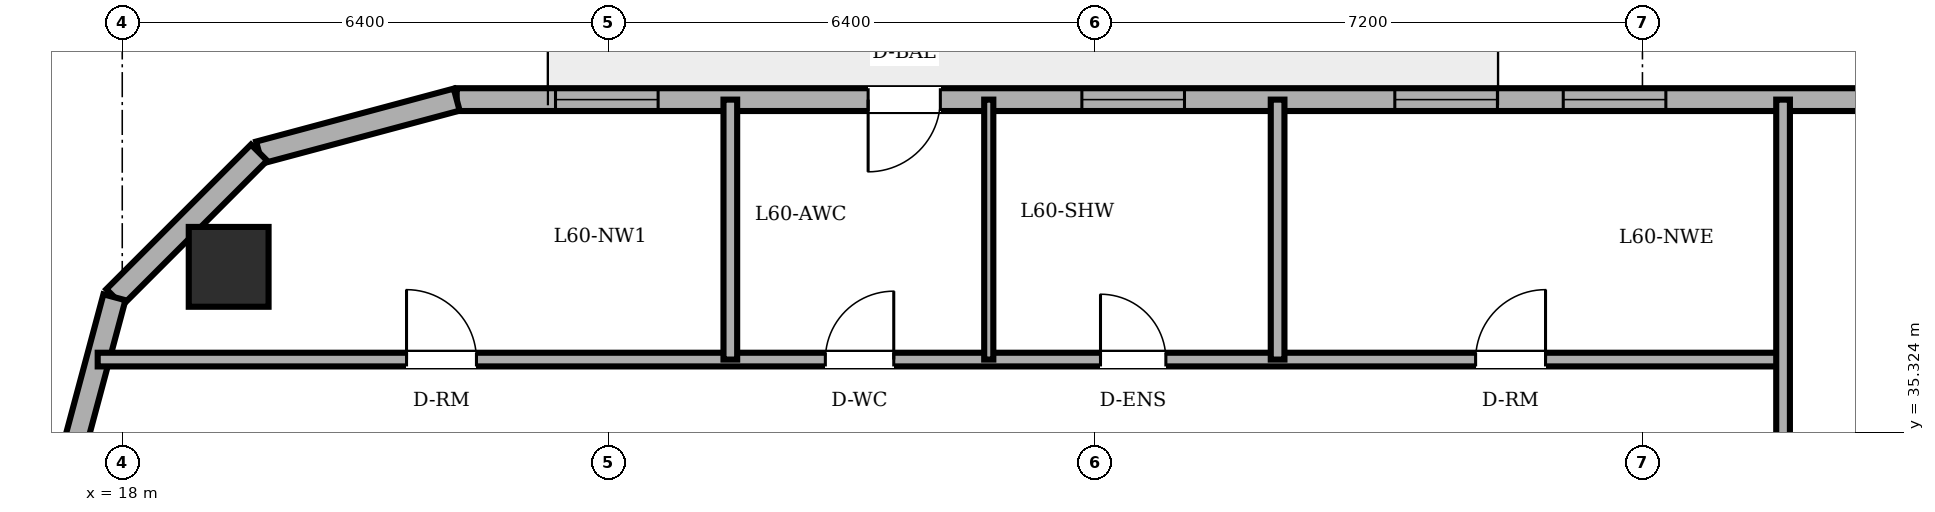
"""IFC4 building model, lengths in metres.
Left out: names, types, materials, properties, quantities, classifications, styles, units other than length and angle.
Written with IfcOpenShell. Run it as: python <this file> out.ifc"""

import sys

from ifc_helpers import new_model, si_unit, direction, frame, frame_2d, origin, origin_2d, place, context, subcontext, project, spatial, rectangle, circle, extrude, element, fill, save


model = new_model("IFC4")
c1 = context("Model", 3, precision=1e-05, world=origin(), true_north=direction((0.0, 1.0)))
c2 = subcontext(c1, "Body", "Model", "MODEL_VIEW")
j1 = project(units=[si_unit("LENGTHUNIT", "METRE"), si_unit("PLANEANGLEUNIT", "RADIAN")], contexts=[c1])
p1 = place(None, origin())
s1 = spatial("IfcSite", under=j1, at=p1, CompositionType="ELEMENT")
p2 = place(p1, origin())
s2 = spatial("IfcBuilding", under=s1, at=p2, CompositionType="ELEMENT")
p3 = place(p2, frame((0.0, 0.0, 230.1)))
s3 = spatial("IfcBuildingStorey", under=s2, at=p3, CompositionType="ELEMENT", Elevation=230.1)
p4 = place(p3, frame((19.4, 37.5, 0.0), z_axis=(0.0, 0.0, 1.0), x_axis=(1.0, 0.0, 0.0)))
e1 = element("IfcColumn", 1, at=p4, inside=s3, PredefinedType="COLUMN", context=c2, shape_type="SweptSolid", body=[
    extrude(circle(Radius=0.525, at=origin_2d()), origin(), (0.0, 0.0, 1.0), 3.6),
])
p5 = place(p3, frame((54.885, 39.7, 0.0), z_axis=(0.0, 0.0, 1.0), x_axis=(-1.0, 0.0, 0.0)))
e2 = element("IfcWall", 2, at=p5, inside=s3, PredefinedType="SOLIDWALL", context=c2, shape_type="SweptSolid", body=[
    extrude(rectangle(XDim=32.485, YDim=0.3, at=frame_2d((16.243, 0.0))), origin(), (0.0, 0.0, 1.0), 3.4),
])
p6 = place(p5, frame((26.122, 0.0, 0.0)))
e3 = element("IfcOpeningElement", 3, at=p6, cuts=e2, PredefinedType="OPENING", context=c2, shape_type="SweptSolid", body=[
    extrude(rectangle(XDim=0.95, YDim=2.2, at=frame_2d((0.475, 1.1))), frame((0.0, 0.16, 0.0), z_axis=(0.0, -1.0, 0.0), x_axis=(1.0, 0.0, 0.0)), (0.0, 0.0, 1.0), 0.32),
])
p7 = place(p5, frame((4.57, 0.0, 0.85)))
e4 = element("IfcOpeningElement", 4, at=p7, cuts=e2, PredefinedType="OPENING", context=c2, shape_type="SweptSolid", body=[
    extrude(rectangle(XDim=1.35, YDim=1.55, at=frame_2d((0.675, 0.775))), frame((0.0, 0.16, 0.0), z_axis=(0.0, -1.0, 0.0), x_axis=(1.0, 0.0, 0.0)), (0.0, 0.0, 1.0), 0.32),
])
p8 = place(p5, frame((9.465, 0.0, 0.85)))
e5 = element("IfcOpeningElement", 5, at=p8, cuts=e2, PredefinedType="OPENING", context=c2, shape_type="SweptSolid", body=[
    extrude(rectangle(XDim=1.35, YDim=1.55, at=frame_2d((0.675, 0.775))), frame((0.0, 0.16, 0.0), z_axis=(0.0, -1.0, 0.0), x_axis=(1.0, 0.0, 0.0)), (0.0, 0.0, 1.0), 0.32),
])
p9 = place(p5, frame((16.577, 0.0, 0.85)))
e6 = element("IfcOpeningElement", 6, at=p9, cuts=e2, PredefinedType="OPENING", context=c2, shape_type="SweptSolid", body=[
    extrude(rectangle(XDim=1.35, YDim=1.55, at=frame_2d((0.675, 0.775))), frame((0.0, 0.16, 0.0), z_axis=(0.0, -1.0, 0.0), x_axis=(1.0, 0.0, 0.0)), (0.0, 0.0, 1.0), 0.32),
])
p10 = place(p5, frame((18.793, 0.0, 0.85)))
e7 = element("IfcOpeningElement", 7, at=p10, cuts=e2, PredefinedType="OPENING", context=c2, shape_type="SweptSolid", body=[
    extrude(rectangle(XDim=1.35, YDim=1.55, at=frame_2d((0.675, 0.775))), frame((0.0, 0.16, 0.0), z_axis=(0.0, -1.0, 0.0), x_axis=(1.0, 0.0, 0.0)), (0.0, 0.0, 1.0), 0.32),
])
p11 = place(p5, frame((22.91, 0.0, 0.85)))
e8 = element("IfcOpeningElement", 8, at=p11, cuts=e2, PredefinedType="OPENING", context=c2, shape_type="SweptSolid", body=[
    extrude(rectangle(XDim=1.35, YDim=1.55, at=frame_2d((0.675, 0.775))), frame((0.0, 0.16, 0.0), z_axis=(0.0, -1.0, 0.0), x_axis=(1.0, 0.0, 0.0)), (0.0, 0.0, 1.0), 0.32),
])
p12 = place(p5, frame((29.835, 0.0, 0.85)))
e9 = element("IfcOpeningElement", 9, at=p12, cuts=e2, PredefinedType="OPENING", context=c2, shape_type="SweptSolid", body=[
    extrude(rectangle(XDim=1.35, YDim=1.55, at=frame_2d((0.675, 0.775))), frame((0.0, 0.16, 0.0), z_axis=(0.0, -1.0, 0.0), x_axis=(1.0, 0.0, 0.0)), (0.0, 0.0, 1.0), 0.32),
])
p13 = place(p3, frame((22.4, 39.7, 0.0), z_axis=(0.0, 0.0, 1.0), x_axis=(-0.965889330541, -0.258955210695, 0.0)))
e10 = element("IfcWall", 10, at=p13, inside=s3, PredefinedType="SOLIDWALL", context=c2, shape_type="SweptSolid", body=[
    extrude(rectangle(XDim=2.692, YDim=0.3, at=frame_2d((1.346, 0.0))), origin(), (0.0, 0.0, 1.0), 3.4),
])
p14 = place(p3, frame((19.8, 39.003, 0.0), z_axis=(0.0, 0.0, 1.0), x_axis=(-0.707152139074, -0.70706142039, 0.0)))
e11 = element("IfcWall", 11, at=p14, inside=s3, PredefinedType="SOLIDWALL", context=c2, shape_type="SweptSolid", body=[
    extrude(rectangle(XDim=2.691, YDim=0.3, at=frame_2d((1.346, 0.0))), origin(), (0.0, 0.0, 1.0), 3.4),
])
p15 = place(p3, frame((17.897, 37.1, 0.0), z_axis=(0.0, 0.0, 1.0), x_axis=(-0.258932525951, -0.965895412042, 0.0)))
e12 = element("IfcWall", 12, at=p15, inside=s3, PredefinedType="SOLIDWALL", context=c2, shape_type="SweptSolid", body=[
    extrude(rectangle(XDim=2.692, YDim=0.3, at=frame_2d((1.346, 0.0))), origin(), (0.0, 0.0, 1.0), 3.4),
])
p16 = place(p3, frame((17.677, 36.28, 0.0), z_axis=(0.0, 0.0, 1.0), x_axis=(1.0, 0.0, 0.0)))
e13 = element("IfcWall", 13, at=p16, inside=s3, PredefinedType="PARTITIONING", context=c2, shape_type="SweptSolid", body=[
    extrude(rectangle(XDim=22.173, YDim=0.18, at=frame_2d((11.086, 0.0))), origin(), (0.0, 0.0, 1.0), 3.4),
])
p17 = place(p16, frame((9.573, 0.0, 0.0)))
e14 = element("IfcOpeningElement", 14, at=p17, cuts=e13, PredefinedType="OPENING", context=c2, shape_type="SweptSolid", body=[
    extrude(rectangle(XDim=0.9, YDim=2.1, at=frame_2d((0.45, 1.05))), frame((0.0, 0.1, 0.0), z_axis=(0.0, -1.0, 0.0), x_axis=(1.0, 0.0, 0.0)), (0.0, 0.0, 1.0), 0.2),
])
p18 = place(p16, frame((13.193, 0.0, 0.0)))
e15 = element("IfcOpeningElement", 15, at=p18, cuts=e13, PredefinedType="OPENING", context=c2, shape_type="SweptSolid", body=[
    extrude(rectangle(XDim=0.86, YDim=2.1, at=frame_2d((0.43, 1.05))), frame((0.0, 0.1, 0.0), z_axis=(0.0, -1.0, 0.0), x_axis=(1.0, 0.0, 0.0)), (0.0, 0.0, 1.0), 0.2),
])
p19 = place(p16, frame((4.063, 0.0, 0.0)))
e16 = element("IfcOpeningElement", 16, at=p19, cuts=e13, PredefinedType="OPENING", context=c2, shape_type="SweptSolid", body=[
    extrude(rectangle(XDim=0.92, YDim=2.1, at=frame_2d((0.46, 1.05))), frame((0.0, 0.1, 0.0), z_axis=(0.0, -1.0, 0.0), x_axis=(1.0, 0.0, 0.0)), (0.0, 0.0, 1.0), 0.2),
])
p20 = place(p16, frame((18.128, 0.0, 0.0)))
e17 = element("IfcOpeningElement", 17, at=p20, cuts=e13, PredefinedType="OPENING", context=c2, shape_type="SweptSolid", body=[
    extrude(rectangle(XDim=0.92, YDim=2.1, at=frame_2d((0.46, 1.05))), frame((0.0, 0.1, 0.0), z_axis=(0.0, -1.0, 0.0), x_axis=(1.0, 0.0, 0.0)), (0.0, 0.0, 1.0), 0.2),
])
p21 = place(p3, frame((26.0, 36.28, 0.0), z_axis=(0.0, 0.0, 1.0), x_axis=(0.0, 1.0, 0.0)))
e18 = element("IfcWall", 18, at=p21, inside=s3, PredefinedType="PARTITIONING", context=c2, shape_type="SweptSolid", body=[
    extrude(rectangle(XDim=3.42, YDim=0.18, at=frame_2d((1.71, 0.0))), origin(), (0.0, 0.0, 1.0), 3.4),
])
p22 = place(p3, frame((29.4, 36.28, 0.0), z_axis=(0.0, 0.0, 1.0), x_axis=(0.0, 1.0, 0.0)))
e19 = element("IfcWall", 19, at=p22, inside=s3, PredefinedType="PARTITIONING", context=c2, shape_type="SweptSolid", body=[
    extrude(rectangle(XDim=3.42, YDim=0.12, at=frame_2d((1.71, 0.0))), origin(), (0.0, 0.0, 1.0), 3.4),
])
p23 = place(p3, frame((33.2, 36.28, 0.0), z_axis=(0.0, 0.0, 1.0), x_axis=(0.0, 1.0, 0.0)))
e20 = element("IfcWall", 20, at=p23, inside=s3, PredefinedType="PARTITIONING", context=c2, shape_type="SweptSolid", body=[
    extrude(rectangle(XDim=3.42, YDim=0.18, at=frame_2d((1.71, 0.0))), origin(), (0.0, 0.0, 1.0), 3.4),
])
p24 = place(p3, frame((39.85, 25.18, 0.0), z_axis=(0.0, 0.0, 1.0), x_axis=(0.0, 1.0, 0.0)))
e21 = element("IfcWall", 21, at=p24, inside=s3, PredefinedType="PARTITIONING", context=c2, shape_type="SweptSolid", body=[
    extrude(rectangle(XDim=14.52, YDim=0.18, at=frame_2d((7.26, 0.0))), origin(), (0.0, 0.0, 1.0), 3.4),
])
p25 = place(p6, origin())
e22 = element("IfcDoor", 22, at=p25, inside=s3, OperationType="SINGLE_SWING_RIGHT", PredefinedType="DOOR", context=c2, shape_type="SweptSolid", body=[
    extrude(rectangle(XDim=0.95, YDim=2.2, at=frame_2d((0.475, 1.1))), frame((0.0, 0.025, 0.0), z_axis=(0.0, -1.0, 0.0), x_axis=(1.0, 0.0, 0.0)), (0.0, 0.0, 1.0), 0.05),
])
fill(e3, e22)
p26 = place(p9, origin())
e23 = element("IfcWindow", 23, at=p26, inside=s3, PartitioningType="SINGLE_PANEL", PredefinedType="WINDOW", context=c2, shape_type="SweptSolid", body=[
    extrude(rectangle(XDim=1.35, YDim=1.55, at=frame_2d((0.675, 0.775))), frame((0.0, 0.03, 0.0), z_axis=(0.0, -1.0, 0.0), x_axis=(1.0, 0.0, 0.0)), (0.0, 0.0, 1.0), 0.06),
])
fill(e6, e23)
p27 = place(p10, origin())
e24 = element("IfcWindow", 24, at=p27, inside=s3, PartitioningType="SINGLE_PANEL", PredefinedType="WINDOW", context=c2, shape_type="SweptSolid", body=[
    extrude(rectangle(XDim=1.35, YDim=1.55, at=frame_2d((0.675, 0.775))), frame((0.0, 0.03, 0.0), z_axis=(0.0, -1.0, 0.0), x_axis=(1.0, 0.0, 0.0)), (0.0, 0.0, 1.0), 0.06),
])
fill(e7, e24)
p28 = place(p11, origin())
e25 = element("IfcWindow", 25, at=p28, inside=s3, PartitioningType="SINGLE_PANEL", PredefinedType="WINDOW", context=c2, shape_type="SweptSolid", body=[
    extrude(rectangle(XDim=1.35, YDim=1.55, at=frame_2d((0.675, 0.775))), frame((0.0, 0.03, 0.0), z_axis=(0.0, -1.0, 0.0), x_axis=(1.0, 0.0, 0.0)), (0.0, 0.0, 1.0), 0.06),
])
fill(e8, e25)
p29 = place(p12, origin())
e26 = element("IfcWindow", 26, at=p29, inside=s3, PartitioningType="SINGLE_PANEL", PredefinedType="WINDOW", context=c2, shape_type="SweptSolid", body=[
    extrude(rectangle(XDim=1.35, YDim=1.55, at=frame_2d((0.675, 0.775))), frame((0.0, 0.03, 0.0), z_axis=(0.0, -1.0, 0.0), x_axis=(1.0, 0.0, 0.0)), (0.0, 0.0, 1.0), 0.06),
])
fill(e9, e26)
p30 = place(p17, origin())
e27 = element("IfcDoor", 27, at=p30, inside=s3, OperationType="SINGLE_SWING_RIGHT", PredefinedType="DOOR", context=c2, shape_type="SweptSolid", body=[
    extrude(rectangle(XDim=0.9, YDim=2.1, at=frame_2d((0.45, 1.05))), frame((0.0, 0.025, 0.0), z_axis=(0.0, -1.0, 0.0), x_axis=(1.0, 0.0, 0.0)), (0.0, 0.0, 1.0), 0.05),
])
fill(e14, e27)
p31 = place(p18, origin())
e28 = element("IfcDoor", 28, at=p31, inside=s3, OperationType="SINGLE_SWING_LEFT", PredefinedType="DOOR", context=c2, shape_type="SweptSolid", body=[
    extrude(rectangle(XDim=0.86, YDim=2.1, at=frame_2d((0.43, 1.05))), frame((0.0, 0.025, 0.0), z_axis=(0.0, -1.0, 0.0), x_axis=(1.0, 0.0, 0.0)), (0.0, 0.0, 1.0), 0.05),
])
fill(e15, e28)
p32 = place(p19, origin())
e29 = element("IfcDoor", 29, at=p32, inside=s3, OperationType="SINGLE_SWING_LEFT", PredefinedType="DOOR", context=c2, shape_type="SweptSolid", body=[
    extrude(rectangle(XDim=0.92, YDim=2.1, at=frame_2d((0.46, 1.05))), frame((0.0, 0.025, 0.0), z_axis=(0.0, -1.0, 0.0), x_axis=(1.0, 0.0, 0.0)), (0.0, 0.0, 1.0), 0.05),
])
fill(e16, e29)
p33 = place(p20, origin())
e30 = element("IfcDoor", 30, at=p33, inside=s3, OperationType="SINGLE_SWING_RIGHT", PredefinedType="DOOR", context=c2, shape_type="SweptSolid", body=[
    extrude(rectangle(XDim=0.92, YDim=2.1, at=frame_2d((0.46, 1.05))), frame((0.0, 0.025, 0.0), z_axis=(0.0, -1.0, 0.0), x_axis=(1.0, 0.0, 0.0)), (0.0, 0.0, 1.0), 0.05),
])
fill(e17, e30)
save(model, sys.argv[1])
